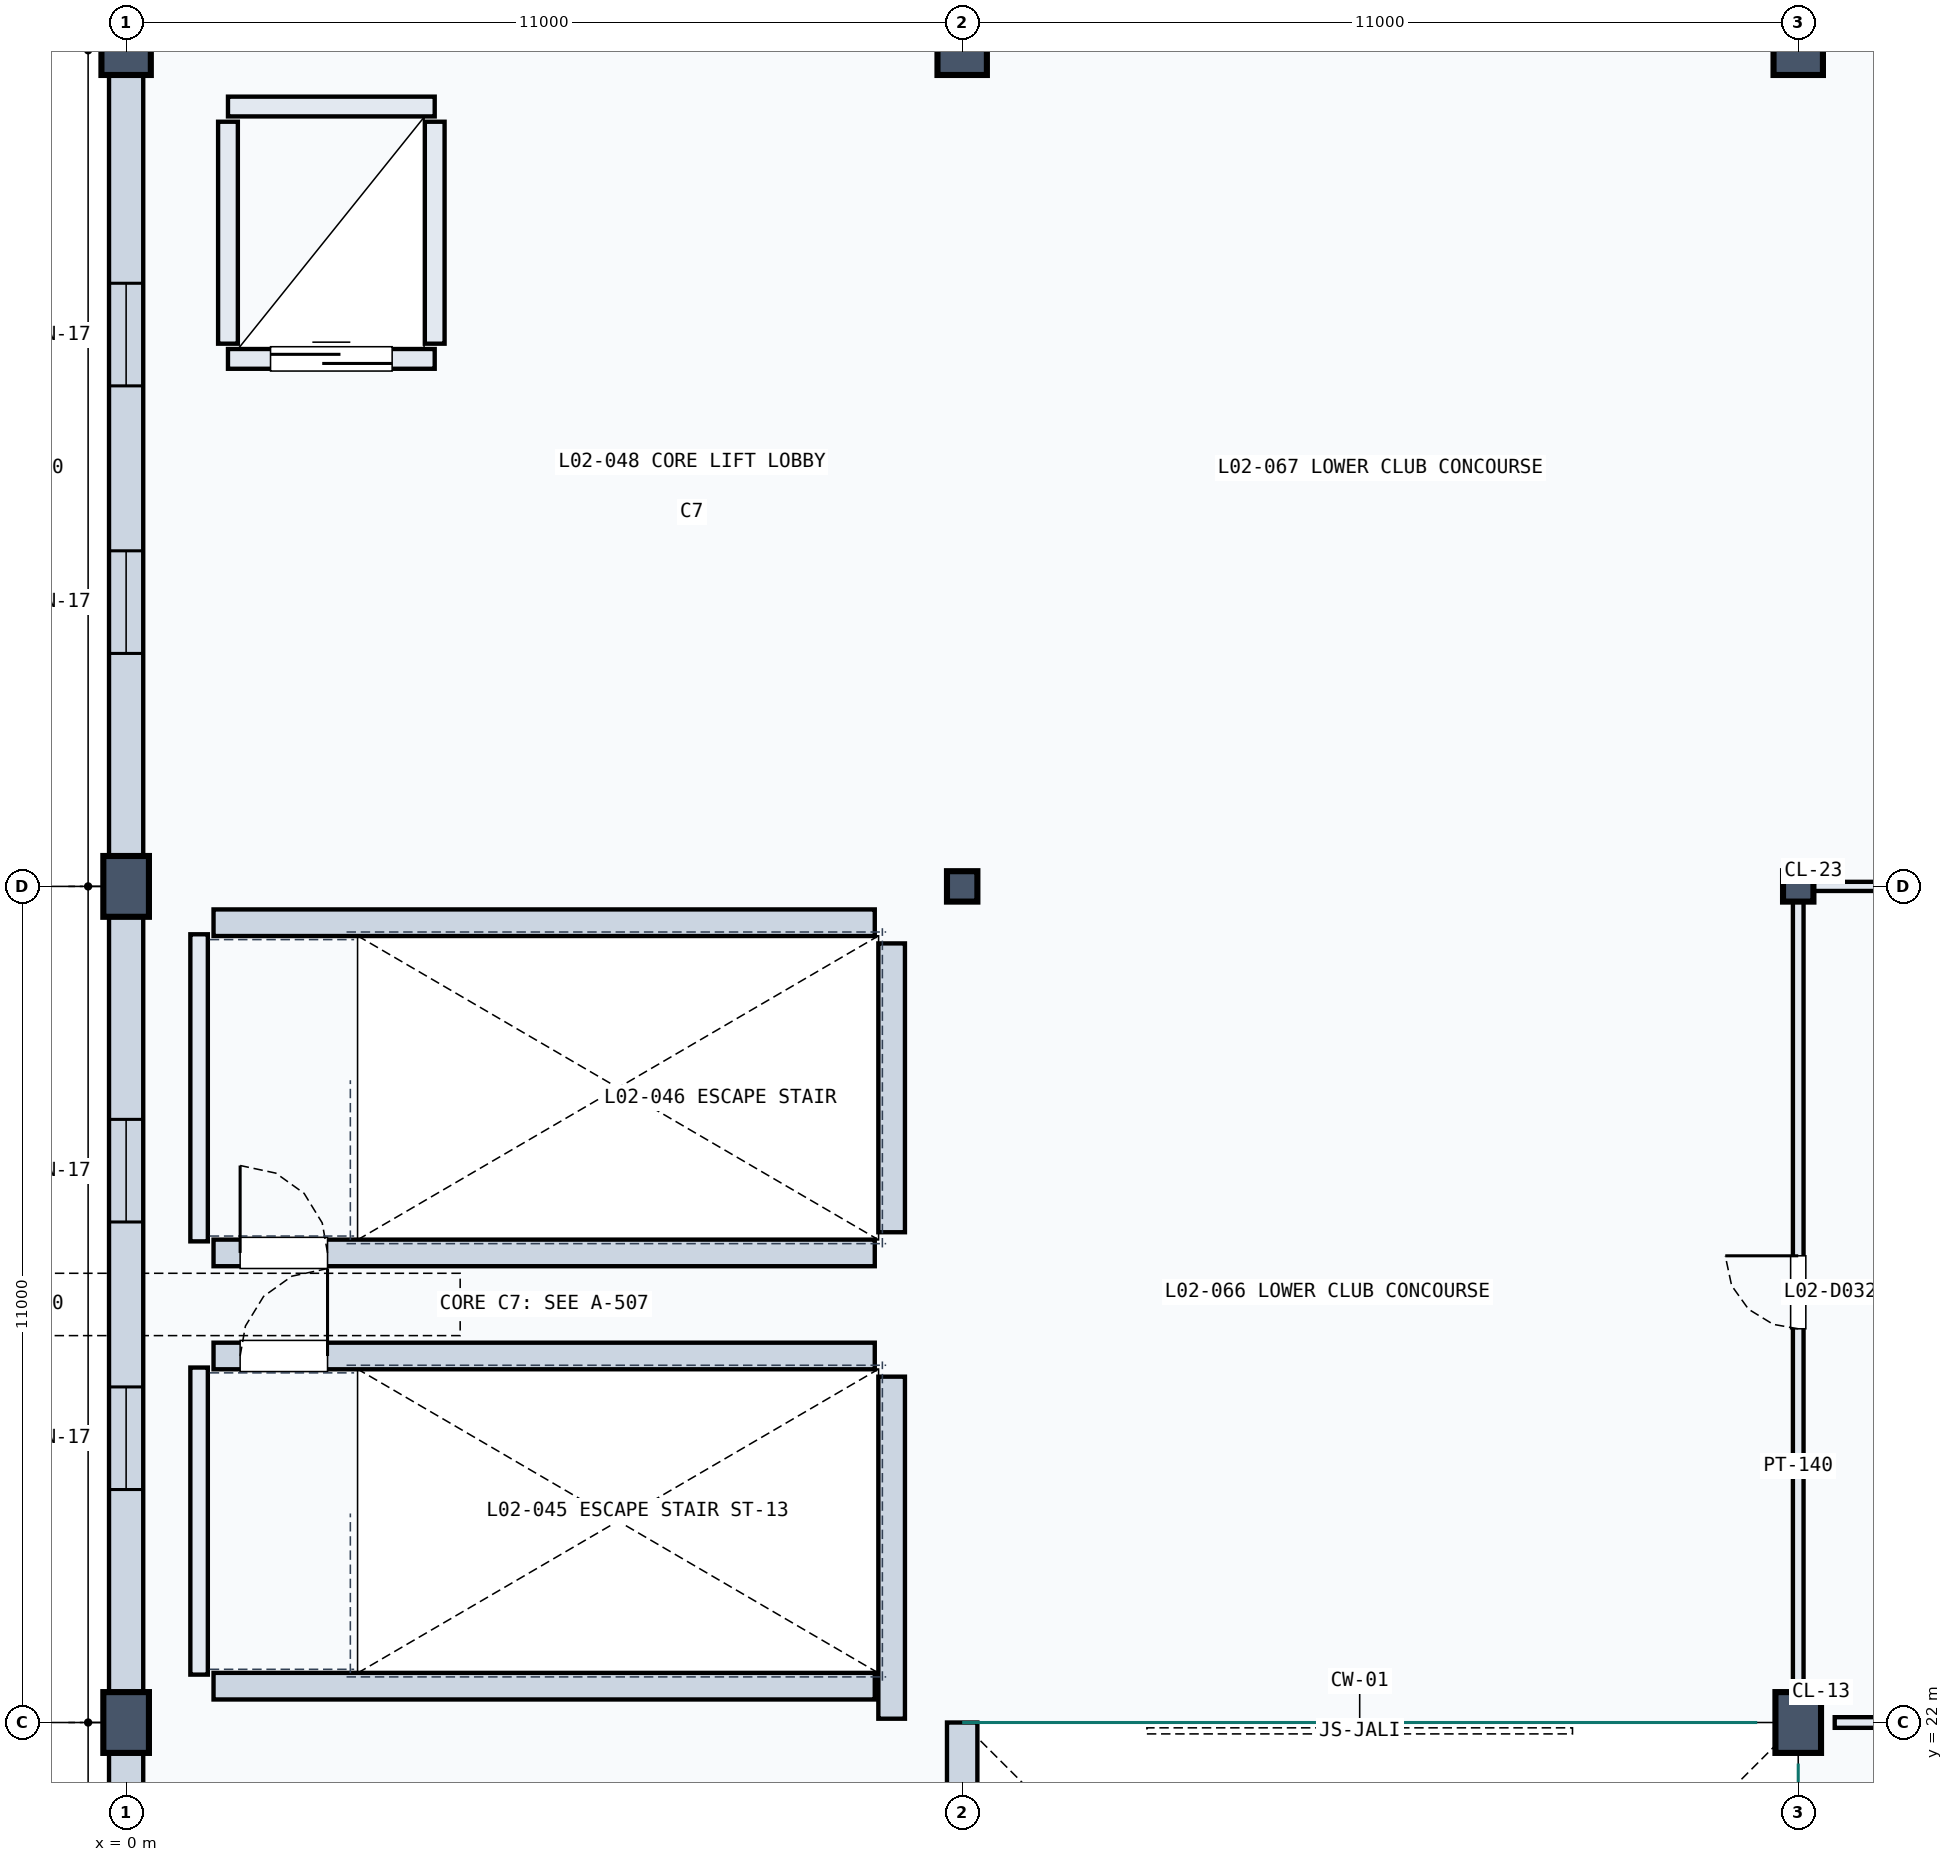
"""IFC4 building model, lengths in metres.
Left out: names, types, materials, properties, quantities, classifications, styles, units other than length and angle.
Written with IfcOpenShell. Run it as: python <this file> out.ifc"""

import sys

from ifc_helpers import new_model, si_unit, direction, frame, frame_2d, origin, origin_2d, place, context, subcontext, project, spatial, rectangle, hollow_rectangle, extrude, element, fill, save


model = new_model("IFC4")
c1 = context("Model", 3, precision=1e-05, world=origin(), true_north=direction((0.0, 1.0)))
c2 = subcontext(c1, "Body", "Model", "MODEL_VIEW")
j1 = project(units=[si_unit("LENGTHUNIT", "METRE"), si_unit("PLANEANGLEUNIT", "RADIAN")], contexts=[c1])
p1 = place(None, origin())
s1 = spatial("IfcSite", under=j1, at=p1, CompositionType="ELEMENT")
p2 = place(p1, origin())
s2 = spatial("IfcBuilding", under=s1, at=p2, CompositionType="ELEMENT")
p3 = place(p2, frame((0.0, 0.0, 10.2)))
s3 = spatial("IfcBuildingStorey", under=s2, at=p3, CompositionType="ELEMENT", Elevation=10.2)
for number, where, z_axis, x_axis in (
    (1, (0.0, 22.0, 0.0), (0.0, 0.0, 1.0), (1.0, 0.0, 0.0)),
    (2, (0.0, 33.0, 0.0), (0.0, 0.0, 1.0), (1.0, 0.0, 0.0)),
):
    element("IfcColumn", number, at=place(p3, frame(where, z_axis=z_axis, x_axis=x_axis)), inside=s3, PredefinedType="COLUMN", context=c2, shape_type="SweptSolid", body=[
        extrude(rectangle(XDim=0.6, YDim=0.8, at=origin_2d()), origin(), (0.0, 0.0, 1.0), 4.5),
    ])
p4 = place(p3, frame((0.0, 44.0, 0.0), z_axis=(0.0, 0.0, 1.0), x_axis=(1.0, 0.0, 0.0)))
e3 = element("IfcColumn", 3, at=p4, inside=s3, PredefinedType="COLUMN", context=c2, shape_type="SweptSolid", body=[
    extrude(rectangle(XDim=0.65, YDim=0.65, at=origin_2d()), origin(), (0.0, 0.0, 1.0), 4.5),
])
p5 = place(p3, frame((11.0, 33.0, 0.0), z_axis=(0.0, 0.0, 1.0), x_axis=(1.0, 0.0, 0.0)))
e4 = element("IfcColumn", 4, at=p5, inside=s3, PredefinedType="COLUMN", context=c2, shape_type="SweptSolid", body=[
    extrude(hollow_rectangle(XDim=0.4, YDim=0.4, WallThickness=0.02, at=origin_2d()), origin(), (0.0, 0.0, 1.0), 4.5),
])
p6 = place(p3, frame((11.0, 44.0, 0.0), z_axis=(0.0, 0.0, 1.0), x_axis=(1.0, 0.0, 0.0)))
e5 = element("IfcColumn", 5, at=p6, inside=s3, PredefinedType="COLUMN", context=c2, shape_type="SweptSolid", body=[
    extrude(rectangle(XDim=0.65, YDim=0.65, at=origin_2d()), origin(), (0.0, 0.0, 1.0), 4.5),
])
p7 = place(p3, frame((22.0, 22.0, 0.0), z_axis=(0.0, 0.0, 1.0), x_axis=(1.0, 0.0, 0.0)))
e6 = element("IfcColumn", 6, at=p7, inside=s3, PredefinedType="COLUMN", context=c2, shape_type="SweptSolid", body=[
    extrude(rectangle(XDim=0.6, YDim=0.8, at=origin_2d()), origin(), (0.0, 0.0, 1.0), 4.5),
])
p8 = place(p3, frame((22.0, 33.0, 0.0), z_axis=(0.0, 0.0, 1.0), x_axis=(1.0, 0.0, 0.0)))
e7 = element("IfcColumn", 7, at=p8, inside=s3, PredefinedType="COLUMN", context=c2, shape_type="SweptSolid", body=[
    extrude(hollow_rectangle(XDim=0.4, YDim=0.4, WallThickness=0.02, at=origin_2d()), origin(), (0.0, 0.0, 1.0), 4.5),
])
p9 = place(p3, frame((22.0, 44.0, 0.0), z_axis=(0.0, 0.0, 1.0), x_axis=(1.0, 0.0, 0.0)))
e8 = element("IfcColumn", 8, at=p9, inside=s3, PredefinedType="COLUMN", context=c2, shape_type="SweptSolid", body=[
    extrude(rectangle(XDim=0.65, YDim=0.65, at=origin_2d()), origin(), (0.0, 0.0, 1.0), 4.5),
])
p10 = place(p3, frame((0.0, 11.22, 0.0), z_axis=(0.0, 0.0, 1.0), x_axis=(0.0, 1.0, 0.0)))
e9 = element("IfcWall", 9, at=p10, inside=s3, PredefinedType="SOLIDWALL", context=c2, shape_type="SweptSolid", body=[
    extrude(rectangle(XDim=10.56, YDim=0.45, at=frame_2d((5.28, 0.0))), origin(), (0.0, 0.0, 1.0), 3.405),
])
p11 = place(p10, frame((2.845, 0.0, 0.8)))
e10 = element("IfcOpeningElement", 10, at=p11, cuts=e9, PredefinedType="OPENING", context=c2, shape_type="SweptSolid", body=[
    extrude(rectangle(XDim=1.35, YDim=2.1, at=frame_2d((0.675, 1.05))), frame((0.0, 0.235, 0.0), z_axis=(0.0, -1.0, 0.0), x_axis=(1.0, 0.0, 0.0)), (0.0, 0.0, 1.0), 0.47),
])
p12 = place(p10, frame((6.365, 0.0, 0.8)))
e11 = element("IfcOpeningElement", 11, at=p12, cuts=e9, PredefinedType="OPENING", context=c2, shape_type="SweptSolid", body=[
    extrude(rectangle(XDim=1.35, YDim=2.1, at=frame_2d((0.675, 1.05))), frame((0.0, 0.235, 0.0), z_axis=(0.0, -1.0, 0.0), x_axis=(1.0, 0.0, 0.0)), (0.0, 0.0, 1.0), 0.47),
])
p13 = place(p3, frame((11.0, 11.22, 0.0), z_axis=(0.0, 0.0, 1.0), x_axis=(0.0, 1.0, 0.0)))
e12 = element("IfcWall", 12, at=p13, inside=s3, PredefinedType="SOLIDWALL", context=c2, shape_type="SweptSolid", body=[
    extrude(rectangle(XDim=10.78, YDim=0.4, at=frame_2d((5.39, 0.0))), origin(), (0.0, 0.0, 1.0), 3.405),
])
p14 = place(p13, frame((2.918, 0.0, 0.8)))
e13 = element("IfcOpeningElement", 13, at=p14, cuts=e12, PredefinedType="OPENING", context=c2, shape_type="SweptSolid", body=[
    extrude(rectangle(XDim=1.35, YDim=2.1, at=frame_2d((0.675, 1.05))), frame((0.0, 0.21, 0.0), z_axis=(0.0, -1.0, 0.0), x_axis=(1.0, 0.0, 0.0)), (0.0, 0.0, 1.0), 0.42),
])
p15 = place(p13, frame((6.512, 0.0, 0.8)))
e14 = element("IfcOpeningElement", 14, at=p15, cuts=e12, PredefinedType="OPENING", context=c2, shape_type="SweptSolid", body=[
    extrude(rectangle(XDim=1.35, YDim=2.1, at=frame_2d((0.675, 1.05))), frame((0.0, 0.21, 0.0), z_axis=(0.0, -1.0, 0.0), x_axis=(1.0, 0.0, 0.0)), (0.0, 0.0, 1.0), 0.42),
])
p16 = place(p3, frame((0.0, 22.22, 0.0), z_axis=(0.0, 0.0, 1.0), x_axis=(0.0, 1.0, 0.0)))
e15 = element("IfcWall", 15, at=p16, inside=s3, PredefinedType="SOLIDWALL", context=c2, shape_type="SweptSolid", body=[
    extrude(rectangle(XDim=10.56, YDim=0.45, at=frame_2d((5.28, 0.0))), origin(), (0.0, 0.0, 1.0), 3.405),
])
p17 = place(p16, frame((2.845, 0.0, 0.8)))
e16 = element("IfcOpeningElement", 16, at=p17, cuts=e15, PredefinedType="OPENING", context=c2, shape_type="SweptSolid", body=[
    extrude(rectangle(XDim=1.35, YDim=2.1, at=frame_2d((0.675, 1.05))), frame((0.0, 0.235, 0.0), z_axis=(0.0, -1.0, 0.0), x_axis=(1.0, 0.0, 0.0)), (0.0, 0.0, 1.0), 0.47),
])
p18 = place(p16, frame((6.365, 0.0, 0.8)))
e17 = element("IfcOpeningElement", 17, at=p18, cuts=e15, PredefinedType="OPENING", context=c2, shape_type="SweptSolid", body=[
    extrude(rectangle(XDim=1.35, YDim=2.1, at=frame_2d((0.675, 1.05))), frame((0.0, 0.235, 0.0), z_axis=(0.0, -1.0, 0.0), x_axis=(1.0, 0.0, 0.0)), (0.0, 0.0, 1.0), 0.47),
])
p19 = place(p3, frame((0.0, 33.22, 0.0), z_axis=(0.0, 0.0, 1.0), x_axis=(0.0, 1.0, 0.0)))
e18 = element("IfcWall", 18, at=p19, inside=s3, PredefinedType="SOLIDWALL", context=c2, shape_type="SweptSolid", body=[
    extrude(rectangle(XDim=10.56, YDim=0.45, at=frame_2d((5.28, 0.0))), origin(), (0.0, 0.0, 1.0), 3.405),
])
p20 = place(p19, frame((2.845, 0.0, 0.8)))
e19 = element("IfcOpeningElement", 19, at=p20, cuts=e18, PredefinedType="OPENING", context=c2, shape_type="SweptSolid", body=[
    extrude(rectangle(XDim=1.35, YDim=2.1, at=frame_2d((0.675, 1.05))), frame((0.0, 0.235, 0.0), z_axis=(0.0, -1.0, 0.0), x_axis=(1.0, 0.0, 0.0)), (0.0, 0.0, 1.0), 0.47),
])
p21 = place(p19, frame((6.365, 0.0, 0.8)))
e20 = element("IfcOpeningElement", 20, at=p21, cuts=e18, PredefinedType="OPENING", context=c2, shape_type="SweptSolid", body=[
    extrude(rectangle(XDim=1.35, YDim=2.1, at=frame_2d((0.675, 1.05))), frame((0.0, 0.235, 0.0), z_axis=(0.0, -1.0, 0.0), x_axis=(1.0, 0.0, 0.0)), (0.0, 0.0, 1.0), 0.47),
])
p22 = place(p3, frame((0.96, 22.63, 0.0), z_axis=(0.0, 0.0, 1.0), x_axis=(0.0, 1.0, 0.0)))
e21 = element("IfcWall", 21, at=p22, inside=s3, PredefinedType="SOLIDWALL", context=c2, shape_type="SweptSolid", body=[
    extrude(rectangle(XDim=4.04, YDim=0.23, at=frame_2d((2.02, 0.0))), origin(), (0.0, 0.0, 1.0), 4.14),
])
p23 = place(p3, frame((10.072, 22.05, 0.0), z_axis=(0.0, 0.0, 1.0), x_axis=(0.0, 1.0, 0.0)))
e22 = element("IfcWall", 22, at=p23, inside=s3, PredefinedType="SOLIDWALL", context=c2, shape_type="SweptSolid", body=[
    extrude(rectangle(XDim=4.5, YDim=0.35, at=frame_2d((2.25, 0.0))), origin(), (0.0, 0.0, 1.0), 4.14),
])
p24 = place(p3, frame((1.15, 22.478, 0.0), z_axis=(0.0, 0.0, 1.0), x_axis=(1.0, 0.0, 0.0)))
e23 = element("IfcWall", 23, at=p24, inside=s3, PredefinedType="SOLIDWALL", context=c2, shape_type="SweptSolid", body=[
    extrude(rectangle(XDim=8.7, YDim=0.35, at=frame_2d((4.35, 0.0))), origin(), (0.0, 0.0, 1.0), 4.14),
])
p25 = place(p3, frame((1.15, 26.822, 0.0), z_axis=(0.0, 0.0, 1.0), x_axis=(1.0, 0.0, 0.0)))
e24 = element("IfcWall", 24, at=p25, inside=s3, PredefinedType="SOLIDWALL", context=c2, shape_type="SweptSolid", body=[
    extrude(rectangle(XDim=8.7, YDim=0.35, at=frame_2d((4.35, 0.0))), origin(), (0.0, 0.0, 1.0), 4.14),
])
p26 = place(p25, frame((0.35, 0.0, 0.0)))
e25 = element("IfcOpeningElement", 25, at=p26, cuts=e24, PredefinedType="OPENING", context=c2, shape_type="SweptSolid", body=[
    extrude(rectangle(XDim=1.15, YDim=2.2, at=frame_2d((0.575, 1.1))), frame((0.0, 0.185, 0.0), z_axis=(0.0, -1.0, 0.0), x_axis=(1.0, 0.0, 0.0)), (0.0, 0.0, 1.0), 0.37),
])
p27 = place(p3, frame((0.96, 28.33, 0.0), z_axis=(0.0, 0.0, 1.0), x_axis=(0.0, 1.0, 0.0)))
e26 = element("IfcWall", 26, at=p27, inside=s3, PredefinedType="SOLIDWALL", context=c2, shape_type="SweptSolid", body=[
    extrude(rectangle(XDim=4.04, YDim=0.23, at=frame_2d((2.02, 0.0))), origin(), (0.0, 0.0, 1.0), 4.14),
])
p28 = place(p3, frame((10.072, 28.45, 0.0), z_axis=(0.0, 0.0, 1.0), x_axis=(0.0, 1.0, 0.0)))
e27 = element("IfcWall", 27, at=p28, inside=s3, PredefinedType="SOLIDWALL", context=c2, shape_type="SweptSolid", body=[
    extrude(rectangle(XDim=3.8, YDim=0.35, at=frame_2d((1.9, 0.0))), origin(), (0.0, 0.0, 1.0), 4.14),
])
p29 = place(p3, frame((1.15, 28.178, 0.0), z_axis=(0.0, 0.0, 1.0), x_axis=(1.0, 0.0, 0.0)))
e28 = element("IfcWall", 28, at=p29, inside=s3, PredefinedType="SOLIDWALL", context=c2, shape_type="SweptSolid", body=[
    extrude(rectangle(XDim=8.7, YDim=0.35, at=frame_2d((4.35, 0.0))), origin(), (0.0, 0.0, 1.0), 4.14),
])
p30 = place(p29, frame((0.35, 0.0, 0.0)))
e29 = element("IfcOpeningElement", 29, at=p30, cuts=e28, PredefinedType="OPENING", context=c2, shape_type="SweptSolid", body=[
    extrude(rectangle(XDim=1.15, YDim=2.2, at=frame_2d((0.575, 1.1))), frame((0.0, 0.185, 0.0), z_axis=(0.0, -1.0, 0.0), x_axis=(1.0, 0.0, 0.0)), (0.0, 0.0, 1.0), 0.37),
])
p31 = place(p3, frame((1.15, 32.522, 0.0), z_axis=(0.0, 0.0, 1.0), x_axis=(1.0, 0.0, 0.0)))
e30 = element("IfcWall", 30, at=p31, inside=s3, PredefinedType="SOLIDWALL", context=c2, shape_type="SweptSolid", body=[
    extrude(rectangle(XDim=8.7, YDim=0.35, at=frame_2d((4.35, 0.0))), origin(), (0.0, 0.0, 1.0), 4.14),
])
p32 = place(p3, frame((1.34, 39.94, 0.0), z_axis=(0.0, 0.0, 1.0), x_axis=(1.0, 0.0, 0.0)))
e31 = element("IfcWall", 31, at=p32, inside=s3, PredefinedType="SOLIDWALL", context=c2, shape_type="SweptSolid", body=[
    extrude(rectangle(XDim=2.72, YDim=0.26, at=frame_2d((1.36, 0.0))), origin(), (0.0, 0.0, 1.0), 4.14),
])
p33 = place(p32, frame((0.56, 0.0, 0.0)))
e32 = element("IfcOpeningElement", 32, at=p33, cuts=e31, PredefinedType="OPENING", context=c2, shape_type="SweptSolid", body=[
    extrude(rectangle(XDim=1.6, YDim=2.35, at=frame_2d((0.8, 1.175))), frame((0.0, 0.14, 0.0), z_axis=(0.0, -1.0, 0.0), x_axis=(1.0, 0.0, 0.0)), (0.0, 0.0, 1.0), 0.28),
])
p34 = place(p3, frame((1.34, 43.26, 0.0), z_axis=(0.0, 0.0, 1.0), x_axis=(1.0, 0.0, 0.0)))
e33 = element("IfcWall", 33, at=p34, inside=s3, PredefinedType="SOLIDWALL", context=c2, shape_type="SweptSolid", body=[
    extrude(rectangle(XDim=2.72, YDim=0.26, at=frame_2d((1.36, 0.0))), origin(), (0.0, 0.0, 1.0), 4.14),
])
for number, where, z_axis, x_axis in (
    (34, (1.34, 40.14, 0.0), (0.0, 0.0, 1.0), (0.0, 1.0, 0.0)),
    (35, (4.06, 40.14, 0.0), (0.0, 0.0, 1.0), (0.0, 1.0, 0.0)),
):
    element("IfcWall", number, at=place(p3, frame(where, z_axis=z_axis, x_axis=x_axis)), inside=s3, PredefinedType="SOLIDWALL", context=c2, shape_type="SweptSolid", body=[
        extrude(rectangle(XDim=2.92, YDim=0.26, at=frame_2d((1.46, 0.0))), origin(), (0.0, 0.0, 1.0), 4.14),
    ])
p35 = place(p3, frame((22.0, 22.48, 0.0), z_axis=(0.0, 0.0, 1.0), x_axis=(0.0, 1.0, 0.0)))
e36 = element("IfcWall", 36, at=p35, inside=s3, PredefinedType="PARTITIONING", context=c2, shape_type="SweptSolid", body=[
    extrude(rectangle(XDim=10.36, YDim=0.14, at=frame_2d((5.18, 0.0))), origin(), (0.0, 0.0, 1.0), 3.405),
])
p36 = place(p35, frame((4.7, 0.0, 0.0)))
e37 = element("IfcOpeningElement", 37, at=p36, cuts=e36, PredefinedType="OPENING", context=c2, shape_type="SweptSolid", body=[
    extrude(rectangle(XDim=0.96, YDim=2.15, at=frame_2d((0.48, 1.075))), frame((0.0, 0.08, 0.0), z_axis=(0.0, -1.0, 0.0), x_axis=(1.0, 0.0, 0.0)), (0.0, 0.0, 1.0), 0.16),
])
p37 = place(p3, frame((22.48, 22.0, 0.0), z_axis=(0.0, 0.0, 1.0), x_axis=(1.0, 0.0, 0.0)))
e38 = element("IfcWall", 38, at=p37, inside=s3, PredefinedType="PARTITIONING", context=c2, shape_type="SweptSolid", body=[
    extrude(rectangle(XDim=11.3, YDim=0.14, at=frame_2d((5.65, 0.0))), origin(), (0.0, 0.0, 1.0), 3.405),
])
p38 = place(p3, frame((22.16, 33.0, 0.0), z_axis=(0.0, 0.0, 1.0), x_axis=(1.0, 0.0, 0.0)))
e39 = element("IfcWall", 39, at=p38, inside=s3, PredefinedType="PARTITIONING", context=c2, shape_type="SweptSolid", body=[
    extrude(rectangle(XDim=11.62, YDim=0.12, at=frame_2d((5.81, 0.0))), origin(), (0.0, 0.0, 1.0), 3.19),
])
p39 = place(p17, origin())
e40 = element("IfcWindow", 40, at=p39, inside=s3, PartitioningType="SINGLE_PANEL", PredefinedType="WINDOW", context=c2, shape_type="SweptSolid", body=[
    extrude(rectangle(XDim=1.35, YDim=2.1, at=frame_2d((0.675, 1.05))), frame((0.0, 0.03, 0.0), z_axis=(0.0, -1.0, 0.0), x_axis=(1.0, 0.0, 0.0)), (0.0, 0.0, 1.0), 0.06),
])
fill(e16, e40)
p40 = place(p18, origin())
e41 = element("IfcWindow", 41, at=p40, inside=s3, PartitioningType="SINGLE_PANEL", PredefinedType="WINDOW", context=c2, shape_type="SweptSolid", body=[
    extrude(rectangle(XDim=1.35, YDim=2.1, at=frame_2d((0.675, 1.05))), frame((0.0, 0.03, 0.0), z_axis=(0.0, -1.0, 0.0), x_axis=(1.0, 0.0, 0.0)), (0.0, 0.0, 1.0), 0.06),
])
fill(e17, e41)
p41 = place(p20, origin())
e42 = element("IfcWindow", 42, at=p41, inside=s3, PartitioningType="SINGLE_PANEL", PredefinedType="WINDOW", context=c2, shape_type="SweptSolid", body=[
    extrude(rectangle(XDim=1.35, YDim=2.1, at=frame_2d((0.675, 1.05))), frame((0.0, 0.03, 0.0), z_axis=(0.0, -1.0, 0.0), x_axis=(1.0, 0.0, 0.0)), (0.0, 0.0, 1.0), 0.06),
])
fill(e19, e42)
p42 = place(p21, origin())
e43 = element("IfcWindow", 43, at=p42, inside=s3, PartitioningType="SINGLE_PANEL", PredefinedType="WINDOW", context=c2, shape_type="SweptSolid", body=[
    extrude(rectangle(XDim=1.35, YDim=2.1, at=frame_2d((0.675, 1.05))), frame((0.0, 0.03, 0.0), z_axis=(0.0, -1.0, 0.0), x_axis=(1.0, 0.0, 0.0)), (0.0, 0.0, 1.0), 0.06),
])
fill(e20, e43)
p43 = place(p26, origin())
e44 = element("IfcDoor", 44, at=p43, inside=s3, OperationType="SINGLE_SWING_RIGHT", PredefinedType="DOOR", context=c2, shape_type="SweptSolid", body=[
    extrude(rectangle(XDim=1.15, YDim=2.2, at=frame_2d((0.575, 1.1))), frame((0.0, 0.025, 0.0), z_axis=(0.0, -1.0, 0.0), x_axis=(1.0, 0.0, 0.0)), (0.0, 0.0, 1.0), 0.05),
])
fill(e25, e44)
p44 = place(p30, origin())
e45 = element("IfcDoor", 45, at=p44, inside=s3, OperationType="SINGLE_SWING_LEFT", PredefinedType="DOOR", context=c2, shape_type="SweptSolid", body=[
    extrude(rectangle(XDim=1.15, YDim=2.2, at=frame_2d((0.575, 1.1))), frame((0.0, 0.025, 0.0), z_axis=(0.0, -1.0, 0.0), x_axis=(1.0, 0.0, 0.0)), (0.0, 0.0, 1.0), 0.05),
])
fill(e29, e45)
p45 = place(p33, origin())
e46 = element("IfcDoor", 46, at=p45, inside=s3, OperationType="DOUBLE_DOOR_SLIDING", PredefinedType="DOOR", context=c2, shape_type="SweptSolid", body=[
    extrude(rectangle(XDim=1.6, YDim=2.35, at=frame_2d((0.8, 1.175))), frame((0.0, 0.025, 0.0), z_axis=(0.0, -1.0, 0.0), x_axis=(1.0, 0.0, 0.0)), (0.0, 0.0, 1.0), 0.05),
])
fill(e32, e46)
p46 = place(p36, origin())
e47 = element("IfcDoor", 47, at=p46, inside=s3, OperationType="SINGLE_SWING_RIGHT", PredefinedType="DOOR", context=c2, shape_type="SweptSolid", body=[
    extrude(rectangle(XDim=0.96, YDim=2.15, at=frame_2d((0.48, 1.075))), frame((0.0, 0.025, 0.0), z_axis=(0.0, -1.0, 0.0), x_axis=(1.0, 0.0, 0.0)), (0.0, 0.0, 1.0), 0.05),
])
fill(e37, e47)
save(model, sys.argv[1])
